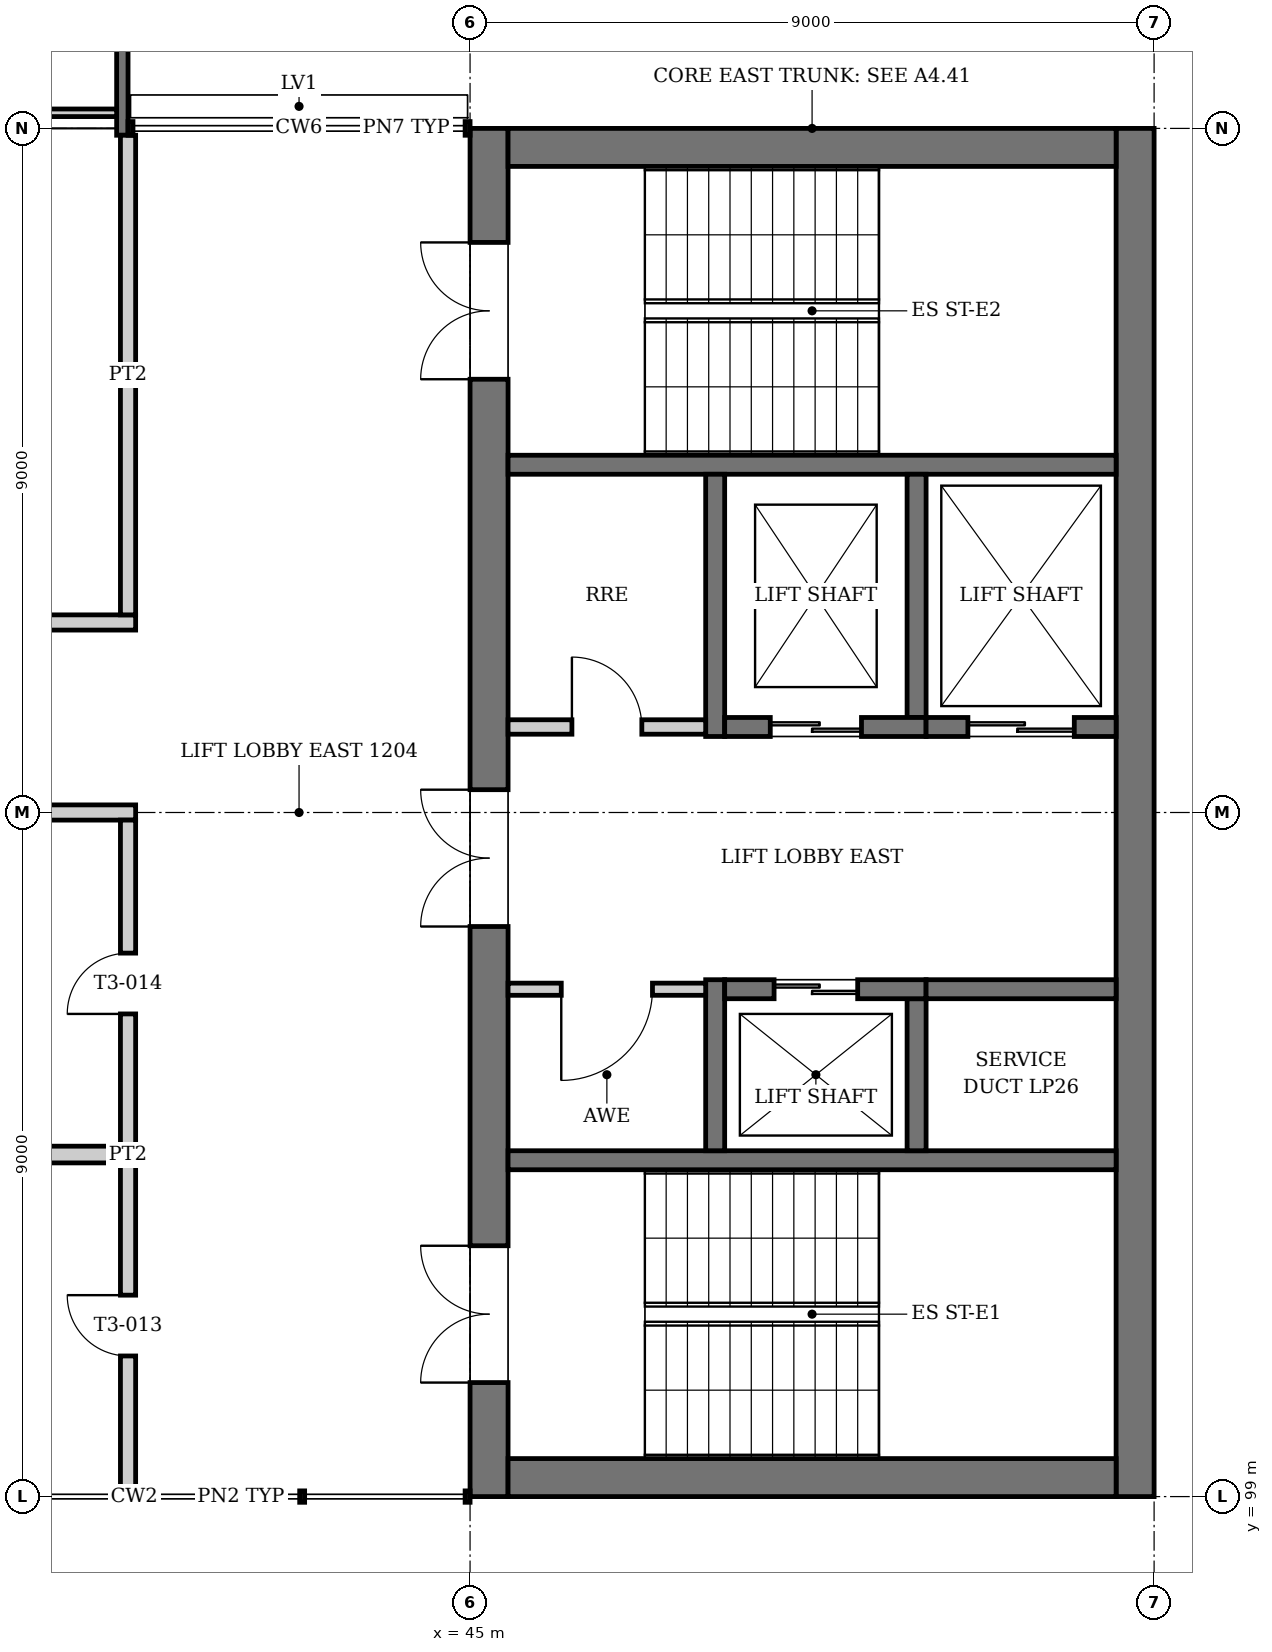
"""IFC4 building model, lengths in metres.
Left out: names, types, materials, properties, quantities, classifications, styles, units other than length and angle.
Written with IfcOpenShell. Run it as: python <this file> out.ifc"""

import sys

from ifc_helpers import new_model, si_unit, direction, frame, frame_2d, origin, place, context, subcontext, project, spatial, rectangle, extrude, element, fill, save


model = new_model("IFC4")
c1 = context("Model", 3, precision=1e-05, world=origin(), true_north=direction((0.0, 1.0)))
c2 = subcontext(c1, "Body", "Model", "MODEL_VIEW")
j1 = project(units=[si_unit("LENGTHUNIT", "METRE"), si_unit("PLANEANGLEUNIT", "RADIAN")], contexts=[c1])
p1 = place(None, origin())
s1 = spatial("IfcSite", under=j1, at=p1, CompositionType="ELEMENT")
p2 = place(p1, origin())
s2 = spatial("IfcBuilding", under=s1, at=p2, CompositionType="ELEMENT")
p3 = place(p2, frame((0.0, 0.0, 51.2)))
s3 = spatial("IfcBuildingStorey", under=s2, at=p3, CompositionType="ELEMENT", Elevation=51.2)
p4 = place(p3, frame((45.25, 99.0, 0.0), z_axis=(0.0, 0.0, 1.0), x_axis=(0.0, 1.0, 0.0)))
e1 = element("IfcWall", 1, at=p4, inside=s3, PredefinedType="SHEAR", context=c2, shape_type="SweptSolid", body=[
    extrude(rectangle(XDim=18.0, YDim=0.5, at=frame_2d((9.0, 0.0))), origin(), (0.0, 0.0, 1.0), 4.0),
])
p5 = place(p4, frame((1.5, 0.0, 0.0)))
e2 = element("IfcOpeningElement", 2, at=p5, cuts=e1, PredefinedType="OPENING", context=c2, shape_type="SweptSolid", body=[
    extrude(rectangle(XDim=1.8, YDim=2.1, at=frame_2d((0.9, 1.05))), frame((0.0, 0.26, 0.0), z_axis=(0.0, -1.0, 0.0), x_axis=(1.0, 0.0, 0.0)), (0.0, 0.0, 1.0), 0.52),
])
p6 = place(p4, frame((14.7, 0.0, 0.0)))
e3 = element("IfcOpeningElement", 3, at=p6, cuts=e1, PredefinedType="OPENING", context=c2, shape_type="SweptSolid", body=[
    extrude(rectangle(XDim=1.8, YDim=2.1, at=frame_2d((0.9, 1.05))), frame((0.0, 0.26, 0.0), z_axis=(0.0, -1.0, 0.0), x_axis=(1.0, 0.0, 0.0)), (0.0, 0.0, 1.0), 0.52),
])
p7 = place(p4, frame((7.5, 0.0, 0.0)))
e4 = element("IfcOpeningElement", 4, at=p7, cuts=e1, PredefinedType="OPENING", context=c2, shape_type="SweptSolid", body=[
    extrude(rectangle(XDim=1.8, YDim=2.1, at=frame_2d((0.9, 1.05))), frame((0.0, 0.26, 0.0), z_axis=(0.0, -1.0, 0.0), x_axis=(1.0, 0.0, 0.0)), (0.0, 0.0, 1.0), 0.52),
])
p8 = place(p3, frame((53.75, 99.0, 0.0), z_axis=(0.0, 0.0, 1.0), x_axis=(0.0, 1.0, 0.0)))
e5 = element("IfcWall", 5, at=p8, inside=s3, PredefinedType="SHEAR", context=c2, shape_type="SweptSolid", body=[
    extrude(rectangle(XDim=18.0, YDim=0.5, at=frame_2d((9.0, 0.0))), origin(), (0.0, 0.0, 1.0), 4.0),
])
for number, where, z_axis, x_axis in (
    (6, (45.5, 99.25, 0.0), (0.0, 0.0, 1.0), (1.0, 0.0, 0.0)),
    (7, (45.5, 116.75, 0.0), (0.0, 0.0, 1.0), (1.0, 0.0, 0.0)),
):
    element("IfcWall", number, at=place(p3, frame(where, z_axis=z_axis, x_axis=x_axis)), inside=s3, PredefinedType="SHEAR", context=c2, shape_type="SweptSolid", body=[
        extrude(rectangle(XDim=8.0, YDim=0.5, at=frame_2d((4.0, 0.0))), origin(), (0.0, 0.0, 1.0), 4.0),
    ])
p9 = place(p3, frame((40.425, 120.45, -0.15), z_axis=(0.0, 0.0, 1.0), x_axis=(0.0, -1.0, 0.0)))
e8 = element("IfcWall", 8, at=p9, inside=s3, PredefinedType="SOLIDWALL", context=c2, shape_type="SweptSolid", body=[
    extrude(rectangle(XDim=3.54, YDim=0.15, at=frame_2d((1.77, 0.0))), origin(), (0.0, 0.0, 1.0), 2.75),
])
p10 = place(p3, frame((31.65, 117.206, 0.0), z_axis=(0.0, 0.0, 1.0), x_axis=(1.0, 0.0, 0.0)))
e9 = element("IfcWall", 9, at=p10, inside=s3, PredefinedType="PARTITIONING", context=c2, shape_type="SweptSolid", body=[
    extrude(rectangle(XDim=8.7, YDim=0.1, at=frame_2d((4.35, 0.0))), origin(), (0.0, 0.0, 1.0), 2.6),
])
p11 = place(p10, frame((4.6, 0.0, 0.0)))
e10 = element("IfcOpeningElement", 10, at=p11, cuts=e9, PredefinedType="OPENING", context=c2, shape_type="SweptSolid", body=[
    extrude(rectangle(XDim=0.9, YDim=2.1, at=frame_2d((0.45, 1.05))), frame((0.0, 0.06, 0.0), z_axis=(0.0, -1.0, 0.0), x_axis=(1.0, 0.0, 0.0)), (0.0, 0.0, 1.0), 0.12),
])
for number, where, z_axis, x_axis in (
    (11, (45.5, 103.425, 0.0), (0.0, 0.0, 1.0), (1.0, 0.0, 0.0)),
    (12, (45.5, 112.575, 0.0), (0.0, 0.0, 1.0), (1.0, 0.0, 0.0)),
):
    element("IfcWall", number, at=place(p3, frame(where, z_axis=z_axis, x_axis=x_axis)), inside=s3, PredefinedType="SOLIDWALL", context=c2, shape_type="SweptSolid", body=[
        extrude(rectangle(XDim=8.0, YDim=0.25, at=frame_2d((4.0, 0.0))), origin(), (0.0, 0.0, 1.0), 3.75),
    ])
p12 = place(p3, frame((48.225, 103.55, 0.0), z_axis=(0.0, 0.0, 1.0), x_axis=(0.0, 1.0, 0.0)))
e13 = element("IfcWall", 13, at=p12, inside=s3, PredefinedType="SOLIDWALL", context=c2, shape_type="SweptSolid", body=[
    extrude(rectangle(XDim=2.25, YDim=0.25, at=frame_2d((1.125, 0.0))), origin(), (0.0, 0.0, 1.0), 4.0),
])
p13 = place(p3, frame((50.875, 103.55, 0.0), z_axis=(0.0, 0.0, 1.0), x_axis=(0.0, 1.0, 0.0)))
e14 = element("IfcWall", 14, at=p13, inside=s3, PredefinedType="SOLIDWALL", context=c2, shape_type="SweptSolid", body=[
    extrude(rectangle(XDim=2.0, YDim=0.25, at=frame_2d((1.0, 0.0))), origin(), (0.0, 0.0, 1.0), 4.0),
])
p14 = place(p3, frame((48.35, 105.675, 0.0), z_axis=(0.0, 0.0, 1.0), x_axis=(1.0, 0.0, 0.0)))
e15 = element("IfcWall", 15, at=p14, inside=s3, PredefinedType="SOLIDWALL", context=c2, shape_type="SweptSolid", body=[
    extrude(rectangle(XDim=2.65, YDim=0.25, at=frame_2d((1.325, 0.0))), origin(), (0.0, 0.0, 1.0), 4.0),
])
p15 = place(p14, frame((0.65, 0.0, 0.0)))
e16 = element("IfcOpeningElement", 16, at=p15, cuts=e15, PredefinedType="OPENING", context=c2, shape_type="SweptSolid", body=[
    extrude(rectangle(XDim=1.1, YDim=2.1, at=frame_2d((0.55, 1.05))), frame((0.0, 0.135, 0.0), z_axis=(0.0, -1.0, 0.0), x_axis=(1.0, 0.0, 0.0)), (0.0, 0.0, 1.0), 0.27),
])
p16 = place(p3, frame((51.0, 105.675, 0.0), z_axis=(0.0, 0.0, 1.0), x_axis=(1.0, 0.0, 0.0)))
e17 = element("IfcWall", 17, at=p16, inside=s3, PredefinedType="SOLIDWALL", context=c2, shape_type="SweptSolid", body=[
    extrude(rectangle(XDim=2.5, YDim=0.25, at=frame_2d((1.25, 0.0))), origin(), (0.0, 0.0, 1.0), 4.0),
])
p17 = place(p3, frame((48.225, 109.0, 0.0), z_axis=(0.0, 0.0, 1.0), x_axis=(0.0, 1.0, 0.0)))
e18 = element("IfcWall", 18, at=p17, inside=s3, PredefinedType="SOLIDWALL", context=c2, shape_type="SweptSolid", body=[
    extrude(rectangle(XDim=3.45, YDim=0.25, at=frame_2d((1.725, 0.0))), origin(), (0.0, 0.0, 1.0), 4.0),
])
p18 = place(p3, frame((50.875, 109.25, 0.0), z_axis=(0.0, 0.0, 1.0), x_axis=(0.0, 1.0, 0.0)))
e19 = element("IfcWall", 19, at=p18, inside=s3, PredefinedType="SOLIDWALL", context=c2, shape_type="SweptSolid", body=[
    extrude(rectangle(XDim=3.2, YDim=0.25, at=frame_2d((1.6, 0.0))), origin(), (0.0, 0.0, 1.0), 4.0),
])
p19 = place(p3, frame((48.35, 109.125, 0.0), z_axis=(0.0, 0.0, 1.0), x_axis=(1.0, 0.0, 0.0)))
e20 = element("IfcWall", 20, at=p19, inside=s3, PredefinedType="SOLIDWALL", context=c2, shape_type="SweptSolid", body=[
    extrude(rectangle(XDim=2.65, YDim=0.25, at=frame_2d((1.325, 0.0))), origin(), (0.0, 0.0, 1.0), 4.0),
])
p20 = place(p19, frame((0.6, 0.0, 0.0)))
e21 = element("IfcOpeningElement", 21, at=p20, cuts=e20, PredefinedType="OPENING", context=c2, shape_type="SweptSolid", body=[
    extrude(rectangle(XDim=1.2, YDim=2.1, at=frame_2d((0.6, 1.05))), frame((0.0, 0.135, 0.0), z_axis=(0.0, -1.0, 0.0), x_axis=(1.0, 0.0, 0.0)), (0.0, 0.0, 1.0), 0.27),
])
p21 = place(p3, frame((51.0, 109.125, 0.0), z_axis=(0.0, 0.0, 1.0), x_axis=(1.0, 0.0, 0.0)))
e22 = element("IfcWall", 22, at=p21, inside=s3, PredefinedType="SOLIDWALL", context=c2, shape_type="SweptSolid", body=[
    extrude(rectangle(XDim=2.5, YDim=0.25, at=frame_2d((1.25, 0.0))), origin(), (0.0, 0.0, 1.0), 4.0),
])
p22 = place(p21, frame((0.55, 0.0, 0.0)))
e23 = element("IfcOpeningElement", 23, at=p22, cuts=e22, PredefinedType="OPENING", context=c2, shape_type="SweptSolid", body=[
    extrude(rectangle(XDim=1.4, YDim=2.4, at=frame_2d((0.7, 1.2))), frame((0.0, 0.135, 0.0), z_axis=(0.0, -1.0, 0.0), x_axis=(1.0, 0.0, 0.0)), (0.0, 0.0, 1.0), 0.27),
])
p23 = place(p3, frame((45.5, 105.675, 0.0), z_axis=(0.0, 0.0, 1.0), x_axis=(1.0, 0.0, 0.0)))
e24 = element("IfcWall", 24, at=p23, inside=s3, PredefinedType="PARTITIONING", context=c2, shape_type="SweptSolid", body=[
    extrude(rectangle(XDim=2.6, YDim=0.16, at=frame_2d((1.3, 0.0))), origin(), (0.0, 0.0, 1.0), 3.75),
])
p24 = place(p23, frame((0.7, 0.0, 0.0)))
e25 = element("IfcOpeningElement", 25, at=p24, cuts=e24, PredefinedType="OPENING", context=c2, shape_type="SweptSolid", body=[
    extrude(rectangle(XDim=1.2, YDim=2.1, at=frame_2d((0.6, 1.05))), frame((0.0, 0.09, 0.0), z_axis=(0.0, -1.0, 0.0), x_axis=(1.0, 0.0, 0.0)), (0.0, 0.0, 1.0), 0.18),
])
p25 = place(p3, frame((45.5, 109.125, 0.0), z_axis=(0.0, 0.0, 1.0), x_axis=(1.0, 0.0, 0.0)))
e26 = element("IfcWall", 26, at=p25, inside=s3, PredefinedType="PARTITIONING", context=c2, shape_type="SweptSolid", body=[
    extrude(rectangle(XDim=2.6, YDim=0.19, at=frame_2d((1.3, 0.0))), origin(), (0.0, 0.0, 1.0), 3.75),
])
p26 = place(p25, frame((0.84, 0.0, 0.0)))
e27 = element("IfcOpeningElement", 27, at=p26, cuts=e26, PredefinedType="OPENING", context=c2, shape_type="SweptSolid", body=[
    extrude(rectangle(XDim=0.92, YDim=2.1, at=frame_2d((0.46, 1.05))), frame((0.0, 0.105, 0.0), z_axis=(0.0, -1.0, 0.0), x_axis=(1.0, 0.0, 0.0)), (0.0, 0.0, 1.0), 0.21),
])
p27 = place(p3, frame((36.075, 103.5, 0.0), z_axis=(0.0, 0.0, 1.0), x_axis=(1.0, 0.0, 0.0)))
e28 = element("IfcWall", 28, at=p27, inside=s3, PredefinedType="PLUMBINGWALL", context=c2, shape_type="SweptSolid", body=[
    extrude(rectangle(XDim=4.325, YDim=0.22, at=frame_2d((2.163, 0.0))), origin(), (0.0, 0.0, 1.0), 3.05),
])
p28 = place(p3, frame((35.925, 108.0, 0.0), z_axis=(0.0, 0.0, 1.0), x_axis=(1.0, 0.0, 0.0)))
e29 = element("IfcWall", 29, at=p28, inside=s3, PredefinedType="PARTITIONING", context=c2, shape_type="SweptSolid", body=[
    extrude(rectangle(XDim=4.675, YDim=0.2, at=frame_2d((2.337, 0.0))), origin(), (0.0, 0.0, 1.0), 3.05),
])
p29 = place(p3, frame((17.9, 110.5, 0.0), z_axis=(0.0, 0.0, 1.0), x_axis=(1.0, 0.0, 0.0)))
e30 = element("IfcWall", 30, at=p29, inside=s3, PredefinedType="PARTITIONING", context=c2, shape_type="SweptSolid", body=[
    extrude(rectangle(XDim=22.7, YDim=0.2, at=frame_2d((11.35, 0.0))), origin(), (0.0, 0.0, 1.0), 3.05),
])
p30 = place(p29, frame((10.45, 0.0, 0.0)))
e31 = element("IfcOpeningElement", 31, at=p30, cuts=e30, PredefinedType="OPENING", context=c2, shape_type="SweptSolid", body=[
    extrude(rectangle(XDim=1.8, YDim=2.1, at=frame_2d((0.9, 1.05))), frame((0.0, 0.11, 0.0), z_axis=(0.0, -1.0, 0.0), x_axis=(1.0, 0.0, 0.0)), (0.0, 0.0, 1.0), 0.22),
])
p31 = place(p3, frame((40.5, 99.075, 0.0), z_axis=(0.0, 0.0, 1.0), x_axis=(0.0, 1.0, 0.0)))
e32 = element("IfcWall", 32, at=p31, inside=s3, PredefinedType="PARTITIONING", context=c2, shape_type="SweptSolid", body=[
    extrude(rectangle(XDim=8.825, YDim=0.2, at=frame_2d((4.413, 0.0))), origin(), (0.0, 0.0, 1.0), 3.05),
])
p32 = place(p31, frame((1.775, 0.0, 0.0)))
e33 = element("IfcOpeningElement", 33, at=p32, cuts=e32, PredefinedType="OPENING", context=c2, shape_type="SweptSolid", body=[
    extrude(rectangle(XDim=0.8, YDim=2.1, at=frame_2d((0.4, 1.05))), frame((0.0, 0.11, 0.0), z_axis=(0.0, -1.0, 0.0), x_axis=(1.0, 0.0, 0.0)), (0.0, 0.0, 1.0), 0.22),
])
p33 = place(p31, frame((6.275, 0.0, 0.0)))
e34 = element("IfcOpeningElement", 34, at=p33, cuts=e32, PredefinedType="OPENING", context=c2, shape_type="SweptSolid", body=[
    extrude(rectangle(XDim=0.8, YDim=2.1, at=frame_2d((0.4, 1.05))), frame((0.0, 0.11, 0.0), z_axis=(0.0, -1.0, 0.0), x_axis=(1.0, 0.0, 0.0)), (0.0, 0.0, 1.0), 0.22),
])
p34 = place(p3, frame((40.5, 110.6, 0.0), z_axis=(0.0, 0.0, 1.0), x_axis=(0.0, 1.0, 0.0)))
e35 = element("IfcWall", 35, at=p34, inside=s3, PredefinedType="PARTITIONING", context=c2, shape_type="SweptSolid", body=[
    extrude(rectangle(XDim=6.31, YDim=0.2, at=frame_2d((3.155, 0.0))), origin(), (0.0, 0.0, 1.0), 3.05),
])
p35 = place(p15, origin())
e36 = element("IfcDoor", 36, at=p35, inside=s3, OperationType="DOUBLE_DOOR_SLIDING", PredefinedType="DOOR", context=c2, shape_type="SweptSolid", body=[
    extrude(rectangle(XDim=1.1, YDim=2.1, at=frame_2d((0.55, 1.05))), frame((0.0, 0.025, 0.0), z_axis=(0.0, -1.0, 0.0), x_axis=(1.0, 0.0, 0.0)), (0.0, 0.0, 1.0), 0.05),
])
fill(e16, e36)
p36 = place(p20, origin())
e37 = element("IfcDoor", 37, at=p36, inside=s3, OperationType="DOUBLE_DOOR_SLIDING", PredefinedType="DOOR", context=c2, shape_type="SweptSolid", body=[
    extrude(rectangle(XDim=1.2, YDim=2.1, at=frame_2d((0.6, 1.05))), frame((0.0, 0.025, 0.0), z_axis=(0.0, -1.0, 0.0), x_axis=(1.0, 0.0, 0.0)), (0.0, 0.0, 1.0), 0.05),
])
fill(e21, e37)
p37 = place(p22, origin())
e38 = element("IfcDoor", 38, at=p37, inside=s3, OperationType="DOUBLE_DOOR_SLIDING", PredefinedType="DOOR", context=c2, shape_type="SweptSolid", body=[
    extrude(rectangle(XDim=1.4, YDim=2.4, at=frame_2d((0.7, 1.2))), frame((0.0, 0.025, 0.0), z_axis=(0.0, -1.0, 0.0), x_axis=(1.0, 0.0, 0.0)), (0.0, 0.0, 1.0), 0.05),
])
fill(e23, e38)
p38 = place(p32, origin())
e39 = element("IfcDoor", 39, at=p38, inside=s3, OperationType="SINGLE_SWING_RIGHT", PredefinedType="DOOR", context=c2, shape_type="SweptSolid", body=[
    extrude(rectangle(XDim=0.8, YDim=2.1, at=frame_2d((0.4, 1.05))), frame((0.0, 0.025, 0.0), z_axis=(0.0, -1.0, 0.0), x_axis=(1.0, 0.0, 0.0)), (0.0, 0.0, 1.0), 0.05),
])
fill(e33, e39)
p39 = place(p33, origin())
e40 = element("IfcDoor", 40, at=p39, inside=s3, OperationType="SINGLE_SWING_LEFT", PredefinedType="DOOR", context=c2, shape_type="SweptSolid", body=[
    extrude(rectangle(XDim=0.8, YDim=2.1, at=frame_2d((0.4, 1.05))), frame((0.0, 0.025, 0.0), z_axis=(0.0, -1.0, 0.0), x_axis=(1.0, 0.0, 0.0)), (0.0, 0.0, 1.0), 0.05),
])
fill(e34, e40)
p40 = place(p5, origin())
e41 = element("IfcDoor", 41, at=p40, inside=s3, OperationType="DOUBLE_DOOR_SINGLE_SWING", PredefinedType="DOOR", context=c2, shape_type="SweptSolid", body=[
    extrude(rectangle(XDim=1.8, YDim=2.1, at=frame_2d((0.9, 1.05))), frame((0.0, 0.025, 0.0), z_axis=(0.0, -1.0, 0.0), x_axis=(1.0, 0.0, 0.0)), (0.0, 0.0, 1.0), 0.05),
])
fill(e2, e41)
p41 = place(p6, origin())
e42 = element("IfcDoor", 42, at=p41, inside=s3, OperationType="DOUBLE_DOOR_SINGLE_SWING", PredefinedType="DOOR", context=c2, shape_type="SweptSolid", body=[
    extrude(rectangle(XDim=1.8, YDim=2.1, at=frame_2d((0.9, 1.05))), frame((0.0, 0.025, 0.0), z_axis=(0.0, -1.0, 0.0), x_axis=(1.0, 0.0, 0.0)), (0.0, 0.0, 1.0), 0.05),
])
fill(e3, e42)
p42 = place(p7, origin())
e43 = element("IfcDoor", 43, at=p42, inside=s3, OperationType="DOUBLE_DOOR_SINGLE_SWING", PredefinedType="DOOR", context=c2, shape_type="SweptSolid", body=[
    extrude(rectangle(XDim=1.8, YDim=2.1, at=frame_2d((0.9, 1.05))), frame((0.0, 0.025, 0.0), z_axis=(0.0, -1.0, 0.0), x_axis=(1.0, 0.0, 0.0)), (0.0, 0.0, 1.0), 0.05),
])
fill(e4, e43)
p43 = place(p24, frame((1.2, 0.0, 0.0), z_axis=(0.0, 0.0, 1.0), x_axis=(-1.0, 0.0, 0.0)))
e44 = element("IfcDoor", 44, at=p43, inside=s3, OperationType="SINGLE_SWING_RIGHT", PredefinedType="DOOR", context=c2, shape_type="SweptSolid", body=[
    extrude(rectangle(XDim=1.2, YDim=2.1, at=frame_2d((0.6, 1.05))), frame((0.0, 0.025, 0.0), z_axis=(0.0, -1.0, 0.0), x_axis=(1.0, 0.0, 0.0)), (0.0, 0.0, 1.0), 0.05),
])
fill(e25, e44)
p44 = place(p26, origin())
e45 = element("IfcDoor", 45, at=p44, inside=s3, OperationType="SINGLE_SWING_LEFT", PredefinedType="DOOR", context=c2, shape_type="SweptSolid", body=[
    extrude(rectangle(XDim=0.92, YDim=2.1, at=frame_2d((0.46, 1.05))), frame((0.0, 0.025, 0.0), z_axis=(0.0, -1.0, 0.0), x_axis=(1.0, 0.0, 0.0)), (0.0, 0.0, 1.0), 0.05),
])
fill(e27, e45)
save(model, sys.argv[1])
